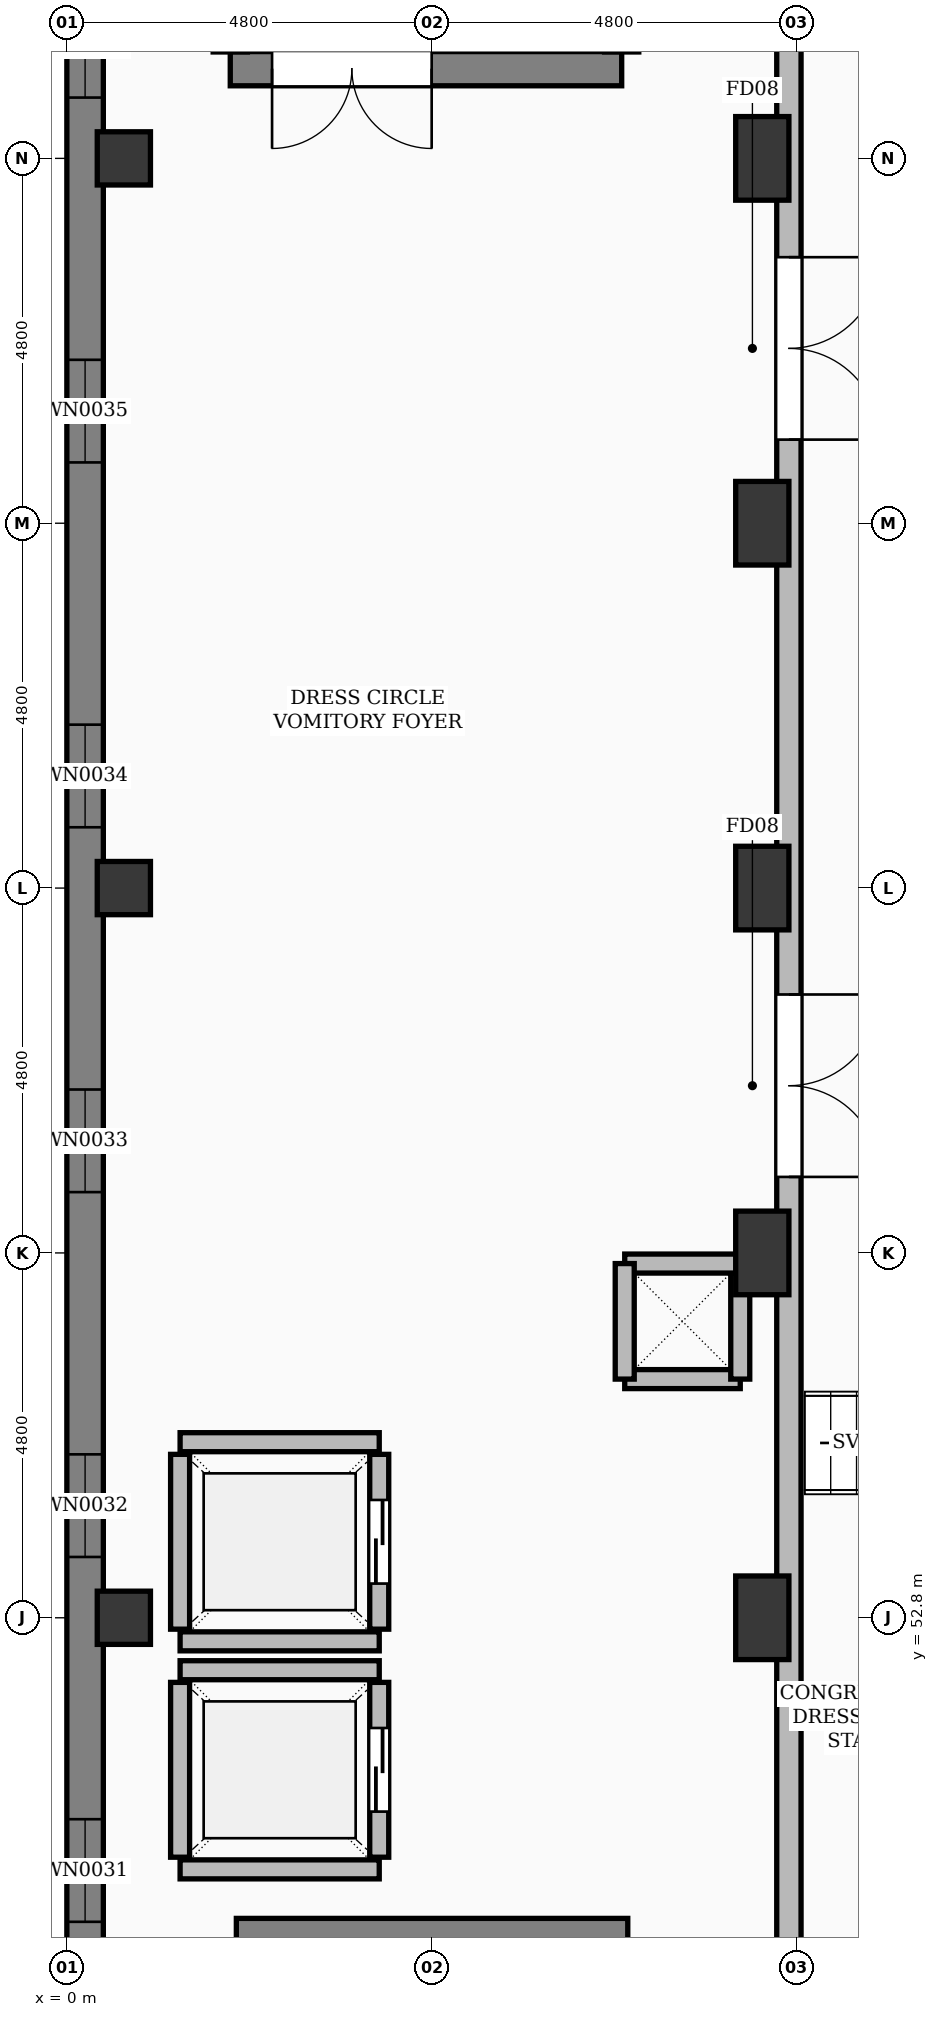
"""IFC4 building model, lengths in metres.
Left out: names, types, materials, properties, quantities, classifications, styles, units other than length and angle.
Written with IfcOpenShell. Run it as: python <this file> out.ifc"""

import sys

from ifc_helpers import new_model, si_unit, direction, frame, frame_2d, origin, origin_2d, place, context, subcontext, project, spatial, rectangle, extrude, element, fill, save


model = new_model("IFC4")
c1 = context("Model", 3, precision=1e-05, world=origin(), true_north=direction((0.0, 1.0)))
c2 = subcontext(c1, "Body", "Model", "MODEL_VIEW")
j1 = project(units=[si_unit("LENGTHUNIT", "METRE"), si_unit("PLANEANGLEUNIT", "RADIAN")], contexts=[c1])
p1 = place(None, origin())
s1 = spatial("IfcSite", under=j1, at=p1, CompositionType="ELEMENT")
p2 = place(p1, origin())
s2 = spatial("IfcBuilding", under=s1, at=p2, CompositionType="ELEMENT")
p3 = place(p2, frame((0.0, 0.0, 6.0)))
s3 = spatial("IfcBuildingStorey", under=s2, at=p3, CompositionType="ELEMENT", Elevation=6.0)
for number, where, z_axis, x_axis in (
    (1, (0.75, 52.8, 0.0), (0.0, 0.0, 1.0), (1.0, 0.0, 0.0)),
    (2, (0.75, 62.4, 0.0), (0.0, 0.0, 1.0), (1.0, 0.0, 0.0)),
    (3, (0.75, 72.0, 0.0), (0.0, 0.0, 1.0), (1.0, 0.0, 0.0)),
):
    element("IfcColumn", number, at=place(p3, frame(where, z_axis=z_axis, x_axis=x_axis)), inside=s3, PredefinedType="COLUMN", context=c2, shape_type="SweptSolid", body=[
        extrude(rectangle(XDim=0.7, YDim=0.7, at=origin_2d()), origin(), (0.0, 0.0, 1.0), 5.4),
    ])
for number, where, z_axis, x_axis in (
    (4, (9.15, 52.8, 0.0), (0.0, 0.0, 1.0), (1.0, 0.0, 0.0)),
    (5, (9.15, 57.6, 0.0), (0.0, 0.0, 1.0), (1.0, 0.0, 0.0)),
    (6, (9.15, 62.4, 0.0), (0.0, 0.0, 1.0), (1.0, 0.0, 0.0)),
    (7, (9.15, 67.2, 0.0), (0.0, 0.0, 1.0), (1.0, 0.0, 0.0)),
    (8, (9.15, 72.0, 0.0), (0.0, 0.0, 1.0), (1.0, 0.0, 0.0)),
):
    element("IfcColumn", number, at=place(p3, frame(where, z_axis=z_axis, x_axis=x_axis)), inside=s3, PredefinedType="COLUMN", context=c2, shape_type="SweptSolid", body=[
        extrude(rectangle(XDim=0.7, YDim=1.1, at=origin_2d()), origin(), (0.0, 0.0, 1.0), 5.4),
    ])
p4 = place(p3, frame((0.24, 33.6, 0.0), z_axis=(0.0, 0.0, 1.0), x_axis=(0.0, 1.0, 0.0)))
e9 = element("IfcWall", 9, at=p4, inside=s3, PredefinedType="SOLIDWALL", context=c2, shape_type="SweptSolid", body=[
    extrude(rectangle(XDim=52.6, YDim=0.48, at=frame_2d((26.3, 0.0))), origin(), (0.0, 0.0, 1.0), 5.4),
])
p5 = place(p4, frame((5.6, 0.0, 0.85)))
e10 = element("IfcOpeningElement", 10, at=p5, cuts=e9, PredefinedType="OPENING", context=c2, shape_type="SweptSolid", body=[
    extrude(rectangle(XDim=1.35, YDim=1.73, at=frame_2d((0.675, 0.865))), frame((0.0, 0.252, 0.0), z_axis=(0.0, -1.0, 0.0), x_axis=(1.0, 0.0, 0.0)), (0.0, 0.0, 1.0), 0.504),
])
p6 = place(p4, frame((10.4, 0.0, 0.85)))
e11 = element("IfcOpeningElement", 11, at=p6, cuts=e9, PredefinedType="OPENING", context=c2, shape_type="SweptSolid", body=[
    extrude(rectangle(XDim=1.35, YDim=1.73, at=frame_2d((0.675, 0.865))), frame((0.0, 0.252, 0.0), z_axis=(0.0, -1.0, 0.0), x_axis=(1.0, 0.0, 0.0)), (0.0, 0.0, 1.0), 0.504),
])
p7 = place(p4, frame((15.2, 0.0, 0.85)))
e12 = element("IfcOpeningElement", 12, at=p7, cuts=e9, PredefinedType="OPENING", context=c2, shape_type="SweptSolid", body=[
    extrude(rectangle(XDim=1.35, YDim=1.73, at=frame_2d((0.675, 0.865))), frame((0.0, 0.252, 0.0), z_axis=(0.0, -1.0, 0.0), x_axis=(1.0, 0.0, 0.0)), (0.0, 0.0, 1.0), 0.504),
])
p8 = place(p4, frame((20.0, 0.0, 0.85)))
e13 = element("IfcOpeningElement", 13, at=p8, cuts=e9, PredefinedType="OPENING", context=c2, shape_type="SweptSolid", body=[
    extrude(rectangle(XDim=1.35, YDim=1.73, at=frame_2d((0.675, 0.865))), frame((0.0, 0.252, 0.0), z_axis=(0.0, -1.0, 0.0), x_axis=(1.0, 0.0, 0.0)), (0.0, 0.0, 1.0), 0.504),
])
p9 = place(p4, frame((24.8, 0.0, 0.85)))
e14 = element("IfcOpeningElement", 14, at=p9, cuts=e9, PredefinedType="OPENING", context=c2, shape_type="SweptSolid", body=[
    extrude(rectangle(XDim=1.35, YDim=1.73, at=frame_2d((0.675, 0.865))), frame((0.0, 0.252, 0.0), z_axis=(0.0, -1.0, 0.0), x_axis=(1.0, 0.0, 0.0)), (0.0, 0.0, 1.0), 0.504),
])
p10 = place(p4, frame((29.6, 0.0, 0.85)))
e15 = element("IfcOpeningElement", 15, at=p10, cuts=e9, PredefinedType="OPENING", context=c2, shape_type="SweptSolid", body=[
    extrude(rectangle(XDim=1.35, YDim=1.73, at=frame_2d((0.675, 0.865))), frame((0.0, 0.252, 0.0), z_axis=(0.0, -1.0, 0.0), x_axis=(1.0, 0.0, 0.0)), (0.0, 0.0, 1.0), 0.504),
])
p11 = place(p4, frame((34.4, 0.0, 0.85)))
e16 = element("IfcOpeningElement", 16, at=p11, cuts=e9, PredefinedType="OPENING", context=c2, shape_type="SweptSolid", body=[
    extrude(rectangle(XDim=1.35, YDim=1.73, at=frame_2d((0.675, 0.865))), frame((0.0, 0.252, 0.0), z_axis=(0.0, -1.0, 0.0), x_axis=(1.0, 0.0, 0.0)), (0.0, 0.0, 1.0), 0.504),
])
p12 = place(p4, frame((39.2, 0.0, 0.85)))
e17 = element("IfcOpeningElement", 17, at=p12, cuts=e9, PredefinedType="OPENING", context=c2, shape_type="SweptSolid", body=[
    extrude(rectangle(XDim=1.35, YDim=1.73, at=frame_2d((0.675, 0.865))), frame((0.0, 0.252, 0.0), z_axis=(0.0, -1.0, 0.0), x_axis=(1.0, 0.0, 0.0)), (0.0, 0.0, 1.0), 0.504),
])
p13 = place(p4, frame((44.0, 0.0, 0.85)))
e18 = element("IfcOpeningElement", 18, at=p13, cuts=e9, PredefinedType="OPENING", context=c2, shape_type="SweptSolid", body=[
    extrude(rectangle(XDim=1.35, YDim=1.73, at=frame_2d((0.675, 0.865))), frame((0.0, 0.252, 0.0), z_axis=(0.0, -1.0, 0.0), x_axis=(1.0, 0.0, 0.0)), (0.0, 0.0, 1.0), 0.504),
])
p14 = place(p4, frame((48.8, 0.0, 0.85)))
e19 = element("IfcOpeningElement", 19, at=p14, cuts=e9, PredefinedType="OPENING", context=c2, shape_type="SweptSolid", body=[
    extrude(rectangle(XDim=1.35, YDim=1.73, at=frame_2d((0.675, 0.865))), frame((0.0, 0.252, 0.0), z_axis=(0.0, -1.0, 0.0), x_axis=(1.0, 0.0, 0.0)), (0.0, 0.0, 1.0), 0.504),
])
p15 = place(p3, frame((2.23, 48.62, 0.0), z_axis=(0.0, 0.0, 1.0), x_axis=(1.0, 0.0, 0.0)))
e20 = element("IfcWall", 20, at=p15, inside=s3, PredefinedType="SHEAR", context=c2, shape_type="SweptSolid", body=[
    extrude(rectangle(XDim=5.15, YDim=0.45, at=frame_2d((2.575, 0.0))), origin(), (0.0, 0.0, 1.0), 5.1),
])
for number, where, z_axis, x_axis in (
    (21, (1.49, 49.49, 0.0), (0.0, 0.0, 1.0), (1.0, 0.0, 0.0)),
    (22, (1.49, 52.11, 0.0), (0.0, 0.0, 1.0), (1.0, 0.0, 0.0)),
):
    element("IfcWall", number, at=place(p3, frame(where, z_axis=z_axis, x_axis=x_axis)), inside=s3, PredefinedType="SOLIDWALL", context=c2, shape_type="SweptSolid", body=[
        extrude(rectangle(XDim=2.62, YDim=0.25, at=frame_2d((1.31, 0.0))), origin(), (0.0, 0.0, 1.0), 5.1),
    ])
p16 = place(p3, frame((1.49, 49.65, 0.0), z_axis=(0.0, 0.0, 1.0), x_axis=(0.0, 1.0, 0.0)))
e23 = element("IfcWall", 23, at=p16, inside=s3, PredefinedType="SOLIDWALL", context=c2, shape_type="SweptSolid", body=[
    extrude(rectangle(XDim=2.3, YDim=0.25, at=frame_2d((1.15, 0.0))), origin(), (0.0, 0.0, 1.0), 5.1),
])
p17 = place(p3, frame((4.11, 49.65, 0.0), z_axis=(0.0, 0.0, 1.0), x_axis=(0.0, 1.0, 0.0)))
e24 = element("IfcWall", 24, at=p17, inside=s3, PredefinedType="SOLIDWALL", context=c2, shape_type="SweptSolid", body=[
    extrude(rectangle(XDim=2.3, YDim=0.25, at=frame_2d((1.15, 0.0))), origin(), (0.0, 0.0, 1.0), 5.1),
])
p18 = place(p17, frame((0.6, 0.0, 0.0)))
e25 = element("IfcOpeningElement", 25, at=p18, cuts=e24, PredefinedType="OPENING", context=c2, shape_type="SweptSolid", body=[
    extrude(rectangle(XDim=1.1, YDim=2.2, at=frame_2d((0.55, 1.1))), frame((0.0, 0.137, 0.0), z_axis=(0.0, -1.0, 0.0), x_axis=(1.0, 0.0, 0.0)), (0.0, 0.0, 1.0), 0.274),
])
p19 = place(p3, frame((1.49, 52.49, 0.0), z_axis=(0.0, 0.0, 1.0), x_axis=(1.0, 0.0, 0.0)))
e26 = element("IfcWall", 26, at=p19, inside=s3, PredefinedType="SOLIDWALL", context=c2, shape_type="SweptSolid", body=[
    extrude(rectangle(XDim=2.62, YDim=0.25, at=frame_2d((1.31, 0.0))), origin(), (0.0, 0.0, 1.0), 4.312),
])
p20 = place(p3, frame((1.49, 55.11, 0.0), z_axis=(0.0, 0.0, 1.0), x_axis=(1.0, 0.0, 0.0)))
e27 = element("IfcWall", 27, at=p20, inside=s3, PredefinedType="SOLIDWALL", context=c2, shape_type="SweptSolid", body=[
    extrude(rectangle(XDim=2.62, YDim=0.25, at=frame_2d((1.31, 0.0))), origin(), (0.0, 0.0, 1.0), 5.1),
])
p21 = place(p3, frame((1.49, 52.65, 0.0), z_axis=(0.0, 0.0, 1.0), x_axis=(0.0, 1.0, 0.0)))
e28 = element("IfcWall", 28, at=p21, inside=s3, PredefinedType="SOLIDWALL", context=c2, shape_type="SweptSolid", body=[
    extrude(rectangle(XDim=2.3, YDim=0.25, at=frame_2d((1.15, 0.0))), origin(), (0.0, 0.0, 1.0), 4.312),
])
p22 = place(p3, frame((4.11, 52.65, 0.0), z_axis=(0.0, 0.0, 1.0), x_axis=(0.0, 1.0, 0.0)))
e29 = element("IfcWall", 29, at=p22, inside=s3, PredefinedType="SOLIDWALL", context=c2, shape_type="SweptSolid", body=[
    extrude(rectangle(XDim=2.3, YDim=0.25, at=frame_2d((1.15, 0.0))), origin(), (0.0, 0.0, 1.0), 4.312),
])
p23 = place(p22, frame((0.6, 0.0, 0.0)))
e30 = element("IfcOpeningElement", 30, at=p23, cuts=e29, PredefinedType="OPENING", context=c2, shape_type="SweptSolid", body=[
    extrude(rectangle(XDim=1.1, YDim=2.2, at=frame_2d((0.55, 1.1))), frame((0.0, 0.137, 0.0), z_axis=(0.0, -1.0, 0.0), x_axis=(1.0, 0.0, 0.0)), (0.0, 0.0, 1.0), 0.274),
])
p24 = place(p3, frame((2.15, 73.18, 0.0), z_axis=(0.0, 0.0, 1.0), x_axis=(1.0, 0.0, 0.0)))
e31 = element("IfcWall", 31, at=p24, inside=s3, PredefinedType="SHEAR", context=c2, shape_type="SweptSolid", body=[
    extrude(rectangle(XDim=5.15, YDim=0.45, at=frame_2d((2.575, 0.0))), origin(), (0.0, 0.0, 1.0), 5.1),
])
p25 = place(p24, frame((0.55, 0.0, 0.0)))
e32 = element("IfcOpeningElement", 32, at=p25, cuts=e31, PredefinedType="OPENING", context=c2, shape_type="SweptSolid", body=[
    extrude(rectangle(XDim=2.1, YDim=2.2, at=frame_2d((1.05, 1.1))), frame((0.0, 0.237, 0.0), z_axis=(0.0, -1.0, 0.0), x_axis=(1.0, 0.0, 0.0)), (0.0, 0.0, 1.0), 0.474),
])
for number, where, z_axis, x_axis in (
    (33, (7.34, 55.94, 0.0), (0.0, 0.0, 1.0), (1.0, 0.0, 0.0)),
    (34, (8.86, 55.94, 0.0), (0.0, 0.0, 1.0), (0.0, 1.0, 0.0)),
    (35, (8.86, 57.46, 0.0), (0.0, 0.0, 1.0), (-1.0, 0.0, 0.0)),
):
    element("IfcWall", number, at=place(p3, frame(where, z_axis=z_axis, x_axis=x_axis)), inside=s3, PredefinedType="SOLIDWALL", context=c2, shape_type="SweptSolid", body=[
        extrude(rectangle(XDim=1.52, YDim=0.25, at=frame_2d((0.76, 0.0))), origin(), (0.0, 0.0, 1.0), 3.692),
    ])
p26 = place(p3, frame((7.34, 57.46, 0.0), z_axis=(0.0, 0.0, 1.0), x_axis=(0.0, -1.0, 0.0)))
e36 = element("IfcWall", 36, at=p26, inside=s3, PredefinedType="SOLIDWALL", context=c2, shape_type="SweptSolid", body=[
    extrude(rectangle(XDim=1.52, YDim=0.25, at=frame_2d((0.76, 0.0))), origin(), (0.0, 0.0, 1.0), 5.1),
])
p27 = place(p3, frame((9.5, 34.2, 0.0), z_axis=(0.0, 0.0, 1.0), x_axis=(0.0, 1.0, 0.0)))
e37 = element("IfcWall", 37, at=p27, inside=s3, PredefinedType="SOLIDWALL", context=c2, shape_type="SweptSolid", body=[
    extrude(rectangle(XDim=51.6, YDim=0.32, at=frame_2d((25.8, 0.0))), origin(), (0.0, 0.0, 1.0), 3.692),
])
p28 = place(p27, frame((24.4, 0.0, 0.0)))
e38 = element("IfcOpeningElement", 38, at=p28, cuts=e37, PredefinedType="OPENING", context=c2, shape_type="SweptSolid", body=[
    extrude(rectangle(XDim=2.4, YDim=2.5, at=frame_2d((1.2, 1.25))), frame((0.0, 0.172, 0.0), z_axis=(0.0, -1.0, 0.0), x_axis=(1.0, 0.0, 0.0)), (0.0, 0.0, 1.0), 0.344),
])
p29 = place(p27, frame((34.1, 0.0, 0.0)))
e39 = element("IfcOpeningElement", 39, at=p29, cuts=e37, PredefinedType="OPENING", context=c2, shape_type="SweptSolid", body=[
    extrude(rectangle(XDim=2.4, YDim=2.5, at=frame_2d((1.2, 1.25))), frame((0.0, 0.172, 0.0), z_axis=(0.0, -1.0, 0.0), x_axis=(1.0, 0.0, 0.0)), (0.0, 0.0, 1.0), 0.344),
])
p30 = place(p7, origin())
e40 = element("IfcWindow", 40, at=p30, inside=s3, PartitioningType="SINGLE_PANEL", PredefinedType="WINDOW", context=c2, shape_type="SweptSolid", body=[
    extrude(rectangle(XDim=1.35, YDim=1.73, at=frame_2d((0.675, 0.865))), frame((0.0, 0.03, 0.0), z_axis=(0.0, -1.0, 0.0), x_axis=(1.0, 0.0, 0.0)), (0.0, 0.0, 1.0), 0.06),
])
fill(e12, e40)
p31 = place(p8, origin())
e41 = element("IfcWindow", 41, at=p31, inside=s3, PartitioningType="SINGLE_PANEL", PredefinedType="WINDOW", context=c2, shape_type="SweptSolid", body=[
    extrude(rectangle(XDim=1.35, YDim=1.73, at=frame_2d((0.675, 0.865))), frame((0.0, 0.03, 0.0), z_axis=(0.0, -1.0, 0.0), x_axis=(1.0, 0.0, 0.0)), (0.0, 0.0, 1.0), 0.06),
])
fill(e13, e41)
p32 = place(p9, origin())
e42 = element("IfcWindow", 42, at=p32, inside=s3, PartitioningType="SINGLE_PANEL", PredefinedType="WINDOW", context=c2, shape_type="SweptSolid", body=[
    extrude(rectangle(XDim=1.35, YDim=1.73, at=frame_2d((0.675, 0.865))), frame((0.0, 0.03, 0.0), z_axis=(0.0, -1.0, 0.0), x_axis=(1.0, 0.0, 0.0)), (0.0, 0.0, 1.0), 0.06),
])
fill(e14, e42)
p33 = place(p10, origin())
e43 = element("IfcWindow", 43, at=p33, inside=s3, PartitioningType="SINGLE_PANEL", PredefinedType="WINDOW", context=c2, shape_type="SweptSolid", body=[
    extrude(rectangle(XDim=1.35, YDim=1.73, at=frame_2d((0.675, 0.865))), frame((0.0, 0.03, 0.0), z_axis=(0.0, -1.0, 0.0), x_axis=(1.0, 0.0, 0.0)), (0.0, 0.0, 1.0), 0.06),
])
fill(e15, e43)
p34 = place(p11, origin())
e44 = element("IfcWindow", 44, at=p34, inside=s3, PartitioningType="SINGLE_PANEL", PredefinedType="WINDOW", context=c2, shape_type="SweptSolid", body=[
    extrude(rectangle(XDim=1.35, YDim=1.73, at=frame_2d((0.675, 0.865))), frame((0.0, 0.03, 0.0), z_axis=(0.0, -1.0, 0.0), x_axis=(1.0, 0.0, 0.0)), (0.0, 0.0, 1.0), 0.06),
])
fill(e16, e44)
p35 = place(p12, origin())
e45 = element("IfcWindow", 45, at=p35, inside=s3, PartitioningType="SINGLE_PANEL", PredefinedType="WINDOW", context=c2, shape_type="SweptSolid", body=[
    extrude(rectangle(XDim=1.35, YDim=1.73, at=frame_2d((0.675, 0.865))), frame((0.0, 0.03, 0.0), z_axis=(0.0, -1.0, 0.0), x_axis=(1.0, 0.0, 0.0)), (0.0, 0.0, 1.0), 0.06),
])
fill(e17, e45)
p36 = place(p18, origin())
e46 = element("IfcDoor", 46, at=p36, inside=s3, OperationType="SLIDING_TO_LEFT", PredefinedType="DOOR", context=c2, shape_type="SweptSolid", body=[
    extrude(rectangle(XDim=1.1, YDim=2.2, at=frame_2d((0.55, 1.1))), frame((0.0, 0.025, 0.0), z_axis=(0.0, -1.0, 0.0), x_axis=(1.0, 0.0, 0.0)), (0.0, 0.0, 1.0), 0.05),
])
fill(e25, e46)
p37 = place(p23, origin())
e47 = element("IfcDoor", 47, at=p37, inside=s3, OperationType="SLIDING_TO_LEFT", PredefinedType="DOOR", context=c2, shape_type="SweptSolid", body=[
    extrude(rectangle(XDim=1.1, YDim=2.2, at=frame_2d((0.55, 1.1))), frame((0.0, 0.025, 0.0), z_axis=(0.0, -1.0, 0.0), x_axis=(1.0, 0.0, 0.0)), (0.0, 0.0, 1.0), 0.05),
])
fill(e30, e47)
p38 = place(p25, frame((2.1, 0.0, 0.0), z_axis=(0.0, 0.0, 1.0), x_axis=(-1.0, 0.0, 0.0)))
e48 = element("IfcDoor", 48, at=p38, inside=s3, OperationType="DOUBLE_DOOR_SINGLE_SWING", PredefinedType="DOOR", context=c2, shape_type="SweptSolid", body=[
    extrude(rectangle(XDim=2.1, YDim=2.2, at=frame_2d((1.05, 1.1))), frame((0.0, 0.025, 0.0), z_axis=(0.0, -1.0, 0.0), x_axis=(1.0, 0.0, 0.0)), (0.0, 0.0, 1.0), 0.05),
])
fill(e32, e48)
p39 = place(p28, frame((2.4, 0.0, 0.0), z_axis=(0.0, 0.0, 1.0), x_axis=(-1.0, 0.0, 0.0)))
e49 = element("IfcDoor", 49, at=p39, inside=s3, OperationType="DOUBLE_DOOR_SINGLE_SWING", PredefinedType="DOOR", context=c2, shape_type="SweptSolid", body=[
    extrude(rectangle(XDim=2.4, YDim=2.5, at=frame_2d((1.2, 1.25))), frame((0.0, 0.025, 0.0), z_axis=(0.0, -1.0, 0.0), x_axis=(1.0, 0.0, 0.0)), (0.0, 0.0, 1.0), 0.05),
])
fill(e38, e49)
p40 = place(p29, frame((2.4, 0.0, 0.0), z_axis=(0.0, 0.0, 1.0), x_axis=(-1.0, 0.0, 0.0)))
e50 = element("IfcDoor", 50, at=p40, inside=s3, OperationType="DOUBLE_DOOR_SINGLE_SWING", PredefinedType="DOOR", context=c2, shape_type="SweptSolid", body=[
    extrude(rectangle(XDim=2.4, YDim=2.5, at=frame_2d((1.2, 1.25))), frame((0.0, 0.025, 0.0), z_axis=(0.0, -1.0, 0.0), x_axis=(1.0, 0.0, 0.0)), (0.0, 0.0, 1.0), 0.05),
])
fill(e39, e50)
save(model, sys.argv[1])
